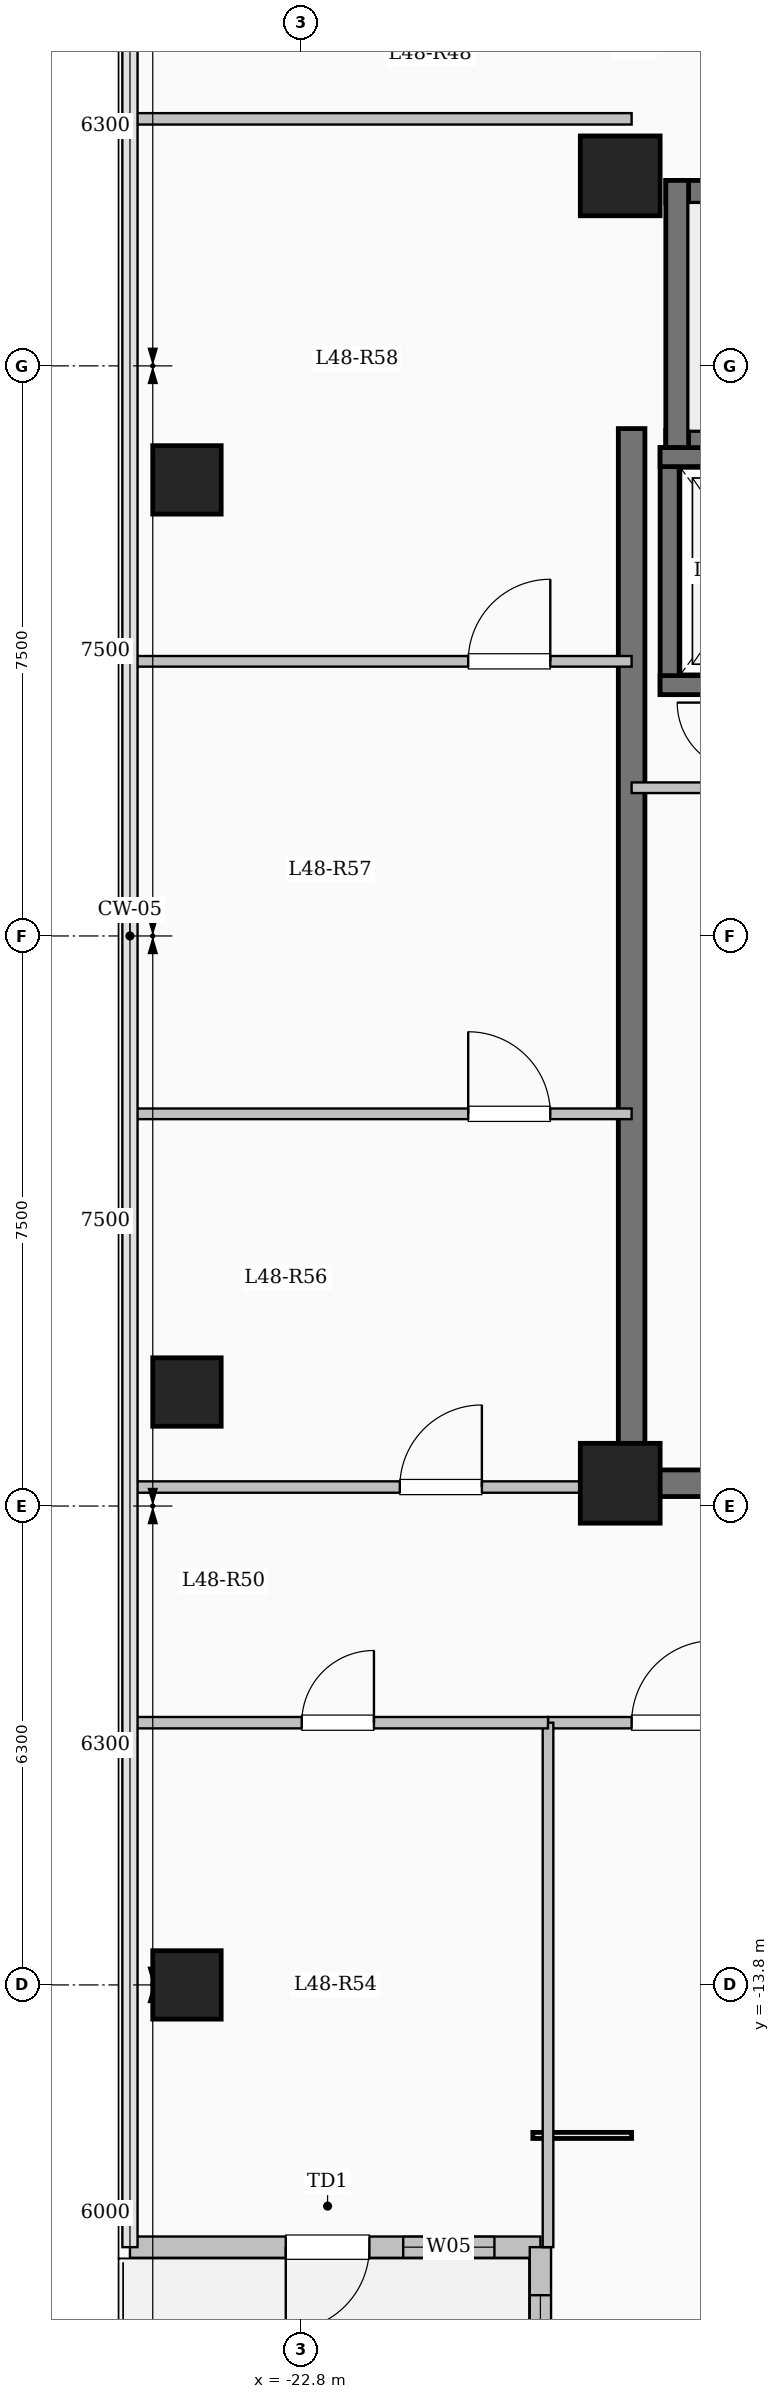
"""IFC4 building model, lengths in metres.
Left out: names, types, materials, properties, quantities, classifications, styles, units other than length and angle.
Written with IfcOpenShell. Run it as: python <this file> out.ifc"""

import sys

from ifc_helpers import new_model, si_unit, direction, frame, frame_2d, origin, origin_2d, place, context, subcontext, project, spatial, rectangle, extrude, element, fill, save


model = new_model("IFC4")
c1 = context("Model", 3, precision=1e-05, world=origin(), true_north=direction((0.0, 1.0)))
c2 = subcontext(c1, "Body", "Model", "MODEL_VIEW")
j1 = project(units=[si_unit("LENGTHUNIT", "METRE"), si_unit("PLANEANGLEUNIT", "RADIAN")], contexts=[c1])
p1 = place(None, origin())
s1 = spatial("IfcSite", under=j1, at=p1, CompositionType="ELEMENT")
p2 = place(p1, origin())
s2 = spatial("IfcBuilding", under=s1, at=p2, CompositionType="ELEMENT")
p3 = place(p2, frame((0.0, 0.0, 177.3)))
s3 = spatial("IfcBuildingStorey", under=s2, at=p3, CompositionType="ELEMENT", Elevation=177.3)
for number, where, z_axis, x_axis in (
    (1, (-18.6, -7.2, 0.0), (0.0, 0.0, 1.0), (1.0, 0.0, 0.0)),
    (2, (-18.6, 10.0, 0.0), (0.0, 0.0, 1.0), (1.0, 0.0, 0.0)),
):
    element("IfcColumn", number, at=place(p3, frame(where, z_axis=z_axis, x_axis=x_axis)), inside=s3, PredefinedType="COLUMN", context=c2, shape_type="SweptSolid", body=[
        extrude(rectangle(XDim=1.05, YDim=1.05, at=origin_2d()), origin(), (0.0, 0.0, 1.0), 4.5),
    ])
for number, where, z_axis, x_axis in (
    (3, (-24.3, -13.8, 0.0), (0.0, 0.0, 1.0), (1.0, 0.0, 0.0)),
    (4, (-24.3, -6.0, 0.0), (0.0, 0.0, 1.0), (1.0, 0.0, 0.0)),
    (5, (-24.3, 6.0, 0.0), (0.0, 0.0, 1.0), (1.0, 0.0, 0.0)),
):
    element("IfcColumn", number, at=place(p3, frame(where, z_axis=z_axis, x_axis=x_axis)), inside=s3, PredefinedType="COLUMN", context=c2, shape_type="SweptSolid", body=[
        extrude(rectangle(XDim=0.9, YDim=0.9, at=origin_2d()), origin(), (0.0, 0.0, 1.0), 4.5),
    ])
p4 = place(p3, frame((-19.65, -17.25, 0.0), z_axis=(0.0, 0.0, 1.0), x_axis=(-1.0, 0.0, 0.0)))
e6 = element("IfcWall", 6, at=p4, inside=s3, PredefinedType="SOLIDWALL", context=c2, shape_type="SweptSolid", body=[
    extrude(rectangle(XDim=5.4, YDim=0.28, at=frame_2d((2.7, 0.0))), origin(), (0.0, 0.0, 1.0), 4.2),
])
p5 = place(p4, frame((2.25, 0.0, 0.0)))
e7 = element("IfcOpeningElement", 7, at=p5, cuts=e6, PredefinedType="OPENING", context=c2, shape_type="SweptSolid", body=[
    extrude(rectangle(XDim=1.1, YDim=2.2, at=frame_2d((0.55, 1.1))), frame((0.0, 0.15, 0.0), z_axis=(0.0, -1.0, 0.0), x_axis=(1.0, 0.0, 0.0)), (0.0, 0.0, 1.0), 0.3),
])
p6 = place(p4, frame((0.605, 0.0, 0.95)))
e8 = element("IfcOpeningElement", 8, at=p6, cuts=e6, PredefinedType="OPENING", context=c2, shape_type="SweptSolid", body=[
    extrude(rectangle(XDim=1.2, YDim=1.5, at=frame_2d((0.6, 0.75))), frame((0.0, 0.15, 0.0), z_axis=(0.0, -1.0, 0.0), x_axis=(1.0, 0.0, 0.0)), (0.0, 0.0, 1.0), 0.3),
])
p7 = place(p3, frame((-19.65, -21.15, 0.0), z_axis=(0.0, 0.0, 1.0), x_axis=(0.0, 1.0, 0.0)))
e9 = element("IfcWall", 9, at=p7, inside=s3, PredefinedType="SOLIDWALL", context=c2, shape_type="SweptSolid", body=[
    extrude(rectangle(XDim=3.9, YDim=0.28, at=frame_2d((1.95, 0.0))), origin(), (0.0, 0.0, 1.0), 4.2),
])
p8 = place(p7, frame((0.668, 0.0, 0.85)))
e10 = element("IfcOpeningElement", 10, at=p8, cuts=e9, PredefinedType="OPENING", context=c2, shape_type="SweptSolid", body=[
    extrude(rectangle(XDim=2.6, YDim=2.4, at=frame_2d((1.3, 1.2))), frame((0.0, 0.15, 0.0), z_axis=(0.0, -1.0, 0.0), x_axis=(1.0, 0.0, 0.0)), (0.0, 0.0, 1.0), 0.3),
])
p9 = place(p3, frame((-18.0, 9.79, 0.0), z_axis=(0.0, 0.0, 1.0), x_axis=(1.0, 0.0, 0.0)))
e11 = element("IfcWall", 11, at=p9, inside=s3, PredefinedType="SHEAR", context=c2, shape_type="SweptSolid", body=[
    extrude(rectangle(XDim=8.0, YDim=0.3, at=frame_2d((4.0, 0.0))), origin(), (0.0, 0.0, 1.0), 4.5),
])
p10 = place(p3, frame((-18.0, 6.5, 0.0), z_axis=(0.0, 0.0, 1.0), x_axis=(1.0, 0.0, 0.0)))
e12 = element("IfcWall", 12, at=p10, inside=s3, PredefinedType="SHEAR", context=c2, shape_type="SweptSolid", body=[
    extrude(rectangle(XDim=8.0, YDim=0.3, at=frame_2d((4.0, 0.0))), origin(), (0.0, 0.0, 1.0), 4.5),
])
p11 = place(p10, frame((6.45, 0.0, 0.0)))
e13 = element("IfcOpeningElement", 13, at=p11, cuts=e12, PredefinedType="OPENING", context=c2, shape_type="SweptSolid", body=[
    extrude(rectangle(XDim=1.0, YDim=2.15, at=frame_2d((0.5, 1.075))), frame((0.0, 0.16, 0.0), z_axis=(0.0, -1.0, 0.0), x_axis=(1.0, 0.0, 0.0)), (0.0, 0.0, 1.0), 0.32),
])
p12 = place(p3, frame((-17.85, 6.35, 0.0), z_axis=(0.0, 0.0, 1.0), x_axis=(0.0, 1.0, 0.0)))
e14 = element("IfcWall", 14, at=p12, inside=s3, PredefinedType="SHEAR", context=c2, shape_type="SweptSolid", body=[
    extrude(rectangle(XDim=3.59, YDim=0.3, at=frame_2d((1.795, 0.0))), origin(), (0.0, 0.0, 1.0), 4.5),
])
p13 = place(p3, frame((-17.95, 3.175, 0.0), z_axis=(0.0, 0.0, 1.0), x_axis=(0.0, 1.0, 0.0)))
e15 = element("IfcWall", 15, at=p13, inside=s3, PredefinedType="SHEAR", context=c2, shape_type="SweptSolid", body=[
    extrude(rectangle(XDim=3.25, YDim=0.25, at=frame_2d((1.625, 0.0))), origin(), (0.0, 0.0, 1.0), 4.5),
])
for number, where, z_axis, x_axis in (
    (16, (-18.075, 3.3, 0.0), (0.0, 0.0, 1.0), (1.0, 0.0, 0.0)),
    (17, (-18.075, 6.3, 0.0), (0.0, 0.0, 1.0), (1.0, 0.0, 0.0)),
):
    element("IfcWall", number, at=place(p3, frame(where, z_axis=z_axis, x_axis=x_axis)), inside=s3, PredefinedType="SHEAR", context=c2, shape_type="SweptSolid", body=[
        extrude(rectangle(XDim=2.55, YDim=0.25, at=frame_2d((1.275, 0.0))), origin(), (0.0, 0.0, 1.0), 4.5),
    ])
p14 = place(p3, frame((-18.45, -7.375, 0.0), z_axis=(0.0, 0.0, 1.0), x_axis=(0.0, 1.0, 0.0)))
e18 = element("IfcWall", 18, at=p14, inside=s3, PredefinedType="SHEAR", context=c2, shape_type="SweptSolid", body=[
    extrude(rectangle(XDim=14.05, YDim=0.35, at=frame_2d((7.025, 0.0))), origin(), (0.0, 0.0, 1.0), 4.5),
])
p15 = place(p3, frame((-18.625, -7.2, 0.0), z_axis=(0.0, 0.0, 1.0), x_axis=(1.0, 0.0, 0.0)))
e19 = element("IfcWall", 19, at=p15, inside=s3, PredefinedType="SHEAR", context=c2, shape_type="SweptSolid", body=[
    extrude(rectangle(XDim=8.55, YDim=0.35, at=frame_2d((4.275, 0.0))), origin(), (0.0, 0.0, 1.0), 4.5),
])
p16 = place(p15, frame((1.875, 0.0, 0.0)))
e20 = element("IfcOpeningElement", 20, at=p16, cuts=e19, PredefinedType="OPENING", context=c2, shape_type="SweptSolid", body=[
    extrude(rectangle(XDim=1.12, YDim=2.15, at=frame_2d((0.56, 1.075))), frame((0.0, 0.185, 0.0), z_axis=(0.0, -1.0, 0.0), x_axis=(1.0, 0.0, 0.0)), (0.0, 0.0, 1.0), 0.37),
])
p17 = place(p3, frame((-18.45, 1.95, 0.0), z_axis=(0.0, 0.0, 1.0), x_axis=(1.0, 0.0, 0.0)))
e21 = element("IfcWall", 21, at=p17, inside=s3, PredefinedType="PARTITIONING", context=c2, shape_type="SweptSolid", body=[
    extrude(rectangle(XDim=3.15, YDim=0.14, at=frame_2d((1.575, 0.0))), origin(), (0.0, 0.0, 1.0), 4.2),
])
p18 = place(p17, frame((1.9, 0.0, 0.0)))
e22 = element("IfcOpeningElement", 22, at=p18, cuts=e21, PredefinedType="OPENING", context=c2, shape_type="SweptSolid", body=[
    extrude(rectangle(XDim=0.9, YDim=2.08, at=frame_2d((0.45, 1.04))), frame((0.0, 0.08, 0.0), z_axis=(0.0, -1.0, 0.0), x_axis=(1.0, 0.0, 0.0)), (0.0, 0.0, 1.0), 0.16),
])
p19 = place(p3, frame((-19.55, -10.35, 0.0), z_axis=(0.0, 0.0, 1.0), x_axis=(1.0, 0.0, 0.0)))
e23 = element("IfcWall", 23, at=p19, inside=s3, PredefinedType="PARTITIONING", context=c2, shape_type="SweptSolid", body=[
    extrude(rectangle(XDim=11.0, YDim=0.15, at=frame_2d((5.5, 0.0))), origin(), (0.0, 0.0, 1.0), 4.2),
])
p20 = place(p19, frame((1.1, 0.0, 0.0)))
e24 = element("IfcOpeningElement", 24, at=p20, cuts=e23, PredefinedType="OPENING", context=c2, shape_type="SweptSolid", body=[
    extrude(rectangle(XDim=1.08, YDim=2.15, at=frame_2d((0.54, 1.075))), frame((0.0, 0.085, 0.0), z_axis=(0.0, -1.0, 0.0), x_axis=(1.0, 0.0, 0.0)), (0.0, 0.0, 1.0), 0.17),
])
p21 = place(p19, frame((6.156, 0.0, 0.0)))
e25 = element("IfcOpeningElement", 25, at=p21, cuts=e23, PredefinedType="OPENING", context=c2, shape_type="SweptSolid", body=[
    extrude(rectangle(XDim=1.08, YDim=2.15, at=frame_2d((0.54, 1.075))), frame((0.0, 0.085, 0.0), z_axis=(0.0, -1.0, 0.0), x_axis=(1.0, 0.0, 0.0)), (0.0, 0.0, 1.0), 0.17),
])
p22 = place(p3, frame((-25.08, -7.25, 0.0), z_axis=(0.0, 0.0, 1.0), x_axis=(1.0, 0.0, 0.0)))
e26 = element("IfcWall", 26, at=p22, inside=s3, PredefinedType="PARTITIONING", context=c2, shape_type="SweptSolid", body=[
    extrude(rectangle(XDim=6.63, YDim=0.15, at=frame_2d((3.315, 0.0))), origin(), (0.0, 0.0, 1.0), 4.2),
])
p23 = place(p22, frame((3.58, 0.0, 0.0)))
e27 = element("IfcOpeningElement", 27, at=p23, cuts=e26, PredefinedType="OPENING", context=c2, shape_type="SweptSolid", body=[
    extrude(rectangle(XDim=1.08, YDim=2.15, at=frame_2d((0.54, 1.075))), frame((0.0, 0.085, 0.0), z_axis=(0.0, -1.0, 0.0), x_axis=(1.0, 0.0, 0.0)), (0.0, 0.0, 1.0), 0.17),
])
p24 = place(p3, frame((-25.08, 10.75, 0.0), z_axis=(0.0, 0.0, 1.0), x_axis=(1.0, 0.0, 0.0)))
e28 = element("IfcWall", 28, at=p24, inside=s3, PredefinedType="PARTITIONING", context=c2, shape_type="SweptSolid", body=[
    extrude(rectangle(XDim=6.63, YDim=0.15, at=frame_2d((3.315, 0.0))), origin(), (0.0, 0.0, 1.0), 4.2),
])
p25 = place(p3, frame((-19.55, -17.25, 0.0), z_axis=(0.0, 0.0, 1.0), x_axis=(0.0, 1.0, 0.0)))
e29 = element("IfcWall", 29, at=p25, inside=s3, PredefinedType="PARTITIONING", context=c2, shape_type="SweptSolid", body=[
    extrude(rectangle(XDim=6.9, YDim=0.14, at=frame_2d((3.45, 0.0))), origin(), (0.0, 0.0, 1.0), 4.2),
])
p26 = place(p3, frame((-25.08, -10.35, 0.0), z_axis=(0.0, 0.0, 1.0), x_axis=(1.0, 0.0, 0.0)))
e30 = element("IfcWall", 30, at=p26, inside=s3, PredefinedType="PARTITIONING", context=c2, shape_type="SweptSolid", body=[
    extrude(rectangle(XDim=5.53, YDim=0.15, at=frame_2d((2.765, 0.0))), origin(), (0.0, 0.0, 1.0), 4.2),
])
p27 = place(p26, frame((2.29, 0.0, 0.0)))
e31 = element("IfcOpeningElement", 31, at=p27, cuts=e30, PredefinedType="OPENING", context=c2, shape_type="SweptSolid", body=[
    extrude(rectangle(XDim=0.95, YDim=2.15, at=frame_2d((0.475, 1.075))), frame((0.0, 0.085, 0.0), z_axis=(0.0, -1.0, 0.0), x_axis=(1.0, 0.0, 0.0)), (0.0, 0.0, 1.0), 0.17),
])
p28 = place(p3, frame((-25.08, -2.34, 0.0), z_axis=(0.0, 0.0, 1.0), x_axis=(1.0, 0.0, 0.0)))
e32 = element("IfcWall", 32, at=p28, inside=s3, PredefinedType="PARTITIONING", context=c2, shape_type="SweptSolid", body=[
    extrude(rectangle(XDim=6.63, YDim=0.14, at=frame_2d((3.315, 0.0))), origin(), (0.0, 0.0, 1.0), 4.2),
])
p29 = place(p28, frame((4.48, 0.0, 0.0)))
e33 = element("IfcOpeningElement", 33, at=p29, cuts=e32, PredefinedType="OPENING", context=c2, shape_type="SweptSolid", body=[
    extrude(rectangle(XDim=1.08, YDim=2.15, at=frame_2d((0.54, 1.075))), frame((0.0, 0.08, 0.0), z_axis=(0.0, -1.0, 0.0), x_axis=(1.0, 0.0, 0.0)), (0.0, 0.0, 1.0), 0.16),
])
p30 = place(p3, frame((-25.08, 3.613, 0.0), z_axis=(0.0, 0.0, 1.0), x_axis=(1.0, 0.0, 0.0)))
e34 = element("IfcWall", 34, at=p30, inside=s3, PredefinedType="PARTITIONING", context=c2, shape_type="SweptSolid", body=[
    extrude(rectangle(XDim=6.63, YDim=0.14, at=frame_2d((3.315, 0.0))), origin(), (0.0, 0.0, 1.0), 4.2),
])
p31 = place(p30, frame((4.48, 0.0, 0.0)))
e35 = element("IfcOpeningElement", 35, at=p31, cuts=e34, PredefinedType="OPENING", context=c2, shape_type="SweptSolid", body=[
    extrude(rectangle(XDim=1.08, YDim=2.15, at=frame_2d((0.54, 1.075))), frame((0.0, 0.08, 0.0), z_axis=(0.0, -1.0, 0.0), x_axis=(1.0, 0.0, 0.0)), (0.0, 0.0, 1.0), 0.16),
])
p32 = place(p5, origin())
e36 = element("IfcDoor", 36, at=p32, inside=s3, OperationType="SINGLE_SWING_RIGHT", PredefinedType="DOOR", context=c2, shape_type="SweptSolid", body=[
    extrude(rectangle(XDim=1.1, YDim=2.2, at=frame_2d((0.55, 1.1))), frame((0.0, 0.025, 0.0), z_axis=(0.0, -1.0, 0.0), x_axis=(1.0, 0.0, 0.0)), (0.0, 0.0, 1.0), 0.05),
])
fill(e7, e36)
p33 = place(p6, origin())
e37 = element("IfcWindow", 37, at=p33, inside=s3, PartitioningType="SINGLE_PANEL", PredefinedType="WINDOW", context=c2, shape_type="SweptSolid", body=[
    extrude(rectangle(XDim=1.2, YDim=1.5, at=frame_2d((0.6, 0.75))), frame((0.0, 0.03, 0.0), z_axis=(0.0, -1.0, 0.0), x_axis=(1.0, 0.0, 0.0)), (0.0, 0.0, 1.0), 0.06),
])
fill(e8, e37)
p34 = place(p8, origin())
e38 = element("IfcWindow", 38, at=p34, inside=s3, PartitioningType="SINGLE_PANEL", PredefinedType="WINDOW", context=c2, shape_type="SweptSolid", body=[
    extrude(rectangle(XDim=2.6, YDim=2.4, at=frame_2d((1.3, 1.2))), frame((0.0, 0.03, 0.0), z_axis=(0.0, -1.0, 0.0), x_axis=(1.0, 0.0, 0.0)), (0.0, 0.0, 1.0), 0.06),
])
fill(e10, e38)
p35 = place(p20, origin())
e39 = element("IfcDoor", 39, at=p35, inside=s3, OperationType="SINGLE_SWING_RIGHT", PredefinedType="DOOR", context=c2, shape_type="SweptSolid", body=[
    extrude(rectangle(XDim=1.08, YDim=2.15, at=frame_2d((0.54, 1.075))), frame((0.0, 0.025, 0.0), z_axis=(0.0, -1.0, 0.0), x_axis=(1.0, 0.0, 0.0)), (0.0, 0.0, 1.0), 0.05),
])
fill(e24, e39)
p36 = place(p27, origin())
e40 = element("IfcDoor", 40, at=p36, inside=s3, OperationType="SINGLE_SWING_RIGHT", PredefinedType="DOOR", context=c2, shape_type="SweptSolid", body=[
    extrude(rectangle(XDim=0.95, YDim=2.15, at=frame_2d((0.475, 1.075))), frame((0.0, 0.025, 0.0), z_axis=(0.0, -1.0, 0.0), x_axis=(1.0, 0.0, 0.0)), (0.0, 0.0, 1.0), 0.05),
])
fill(e31, e40)
p37 = place(p23, origin())
e41 = element("IfcDoor", 41, at=p37, inside=s3, OperationType="SINGLE_SWING_RIGHT", PredefinedType="DOOR", context=c2, shape_type="SweptSolid", body=[
    extrude(rectangle(XDim=1.08, YDim=2.15, at=frame_2d((0.54, 1.075))), frame((0.0, 0.025, 0.0), z_axis=(0.0, -1.0, 0.0), x_axis=(1.0, 0.0, 0.0)), (0.0, 0.0, 1.0), 0.05),
])
fill(e27, e41)
p38 = place(p29, origin())
e42 = element("IfcDoor", 42, at=p38, inside=s3, OperationType="SINGLE_SWING_LEFT", PredefinedType="DOOR", context=c2, shape_type="SweptSolid", body=[
    extrude(rectangle(XDim=1.08, YDim=2.15, at=frame_2d((0.54, 1.075))), frame((0.0, 0.025, 0.0), z_axis=(0.0, -1.0, 0.0), x_axis=(1.0, 0.0, 0.0)), (0.0, 0.0, 1.0), 0.05),
])
fill(e33, e42)
p39 = place(p31, origin())
e43 = element("IfcDoor", 43, at=p39, inside=s3, OperationType="SINGLE_SWING_RIGHT", PredefinedType="DOOR", context=c2, shape_type="SweptSolid", body=[
    extrude(rectangle(XDim=1.08, YDim=2.15, at=frame_2d((0.54, 1.075))), frame((0.0, 0.025, 0.0), z_axis=(0.0, -1.0, 0.0), x_axis=(1.0, 0.0, 0.0)), (0.0, 0.0, 1.0), 0.05),
])
fill(e35, e43)
save(model, sys.argv[1])
